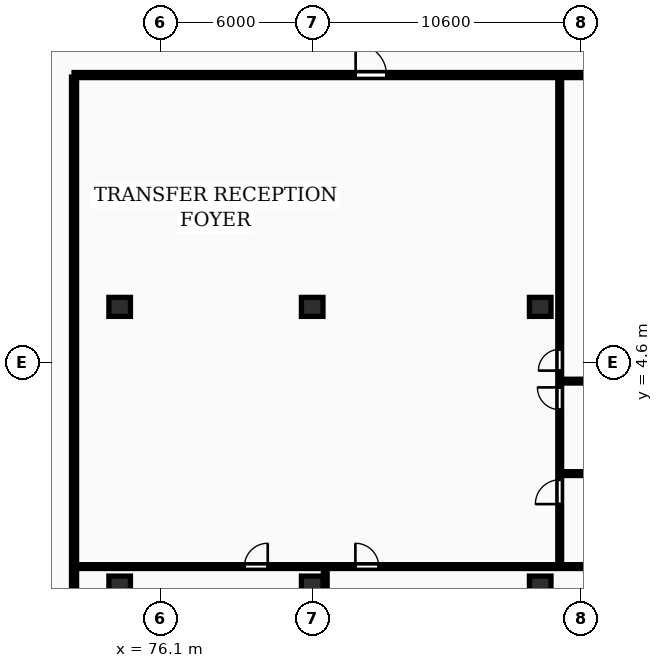
"""IFC4 building model, lengths in metres.
Left out: names, types, materials, properties, quantities, classifications, styles, units other than length and angle.
Written with IfcOpenShell. Run it as: python <this file> out.ifc"""

import sys

from ifc_helpers import new_model, si_unit, direction, frame, frame_2d, origin, origin_2d, place, context, subcontext, project, spatial, rectangle, extrude, element, fill, save


model = new_model("IFC4")
c1 = context("Model", 3, precision=1e-05, world=origin(), true_north=direction((0.0, 1.0)))
c2 = subcontext(c1, "Body", "Model", "MODEL_VIEW")
j1 = project(units=[si_unit("LENGTHUNIT", "METRE"), si_unit("PLANEANGLEUNIT", "RADIAN")], contexts=[c1])
p1 = place(None, origin())
s1 = spatial("IfcSite", under=j1, at=p1, CompositionType="ELEMENT")
p2 = place(p1, origin())
s2 = spatial("IfcBuilding", under=s1, at=p2, CompositionType="ELEMENT")
p3 = place(p2, frame((0.0, 0.0, 93.8)))
s3 = spatial("IfcBuildingStorey", under=s2, at=p3, CompositionType="ELEMENT", Elevation=93.8)
for number, where, z_axis, x_axis in (
    (1, (74.5, -4.2, 0.0), (0.0, 0.0, 1.0), (1.0, 0.0, 0.0)),
    (2, (74.5, 6.8, 0.0), (0.0, 0.0, 1.0), (1.0, 0.0, 0.0)),
    (3, (82.1, -4.2, 0.0), (0.0, 0.0, 1.0), (1.0, 0.0, 0.0)),
    (4, (82.1, 6.8, 0.0), (0.0, 0.0, 1.0), (1.0, 0.0, 0.0)),
    (5, (91.1, -4.2, 0.0), (0.0, 0.0, 1.0), (1.0, 0.0, 0.0)),
    (6, (91.1, 6.8, 0.0), (0.0, 0.0, 1.0), (1.0, 0.0, 0.0)),
):
    element("IfcColumn", number, at=place(p3, frame(where, z_axis=z_axis, x_axis=x_axis)), inside=s3, PredefinedType="COLUMN", context=c2, shape_type="SweptSolid", body=[
        extrude(rectangle(XDim=0.85, YDim=0.75, at=origin_2d()), origin(), (0.0, 0.0, 1.0), 3.25),
    ])
p4 = place(p3, frame((72.7, -8.7, 0.0), z_axis=(0.0, 0.0, 1.0), x_axis=(0.0, 1.0, 0.0)))
e7 = element("IfcWall", 7, at=p4, inside=s3, PredefinedType="PARTITIONING", context=c2, shape_type="SweptSolid", body=[
    extrude(rectangle(XDim=24.57, YDim=0.2, at=frame_2d((12.285, 0.0))), origin(), (0.0, 0.0, 1.0), 2.97),
])
for number, where, z_axis, x_axis in (
    (8, (91.929, 0.22, 0.0), (0.0, 0.0, 1.0), (1.0, 0.0, 0.0)),
    (9, (91.929, 3.87, 0.0), (0.0, 0.0, 1.0), (1.0, 0.0, 0.0)),
):
    element("IfcWall", number, at=place(p3, frame(where, z_axis=z_axis, x_axis=x_axis)), inside=s3, PredefinedType="PARTITIONING", context=c2, shape_type="SweptSolid", body=[
        extrude(rectangle(XDim=3.36, YDim=0.15, at=frame_2d((1.68, 0.0))), origin(), (0.0, 0.0, 1.0), 2.97),
    ])
p5 = place(p3, frame((91.869, -3.39, 0.0), z_axis=(0.0, 0.0, 1.0), x_axis=(0.0, 1.0, 0.0)))
e10 = element("IfcWall", 10, at=p5, inside=s3, PredefinedType="PARTITIONING", context=c2, shape_type="SweptSolid", body=[
    extrude(rectangle(XDim=19.28, YDim=0.15, at=frame_2d((9.64, 0.0))), origin(), (0.0, 0.0, 1.0), 2.97),
])
p6 = place(p5, frame((2.406, 0.0, 0.0)))
e11 = element("IfcOpeningElement", 11, at=p6, cuts=e10, PredefinedType="OPENING", context=c2, shape_type="SweptSolid", body=[
    extrude(rectangle(XDim=0.96, YDim=2.1, at=frame_2d((0.48, 1.05))), frame((0.0, 0.085, 0.0), z_axis=(0.0, -1.0, 0.0), x_axis=(1.0, 0.0, 0.0)), (0.0, 0.0, 1.0), 0.17),
])
p7 = place(p5, frame((6.133, 0.0, 0.0)))
e12 = element("IfcOpeningElement", 12, at=p7, cuts=e10, PredefinedType="OPENING", context=c2, shape_type="SweptSolid", body=[
    extrude(rectangle(XDim=0.88, YDim=2.06, at=frame_2d((0.44, 1.03))), frame((0.0, 0.085, 0.0), z_axis=(0.0, -1.0, 0.0), x_axis=(1.0, 0.0, 0.0)), (0.0, 0.0, 1.0), 0.17),
])
p8 = place(p5, frame((7.674, 0.0, 0.0)))
e13 = element("IfcOpeningElement", 13, at=p8, cuts=e10, PredefinedType="OPENING", context=c2, shape_type="SweptSolid", body=[
    extrude(rectangle(XDim=0.84, YDim=2.04, at=frame_2d((0.42, 1.02))), frame((0.0, 0.085, 0.0), z_axis=(0.0, -1.0, 0.0), x_axis=(1.0, 0.0, 0.0)), (0.0, 0.0, 1.0), 0.17),
])
p9 = place(p3, frame((82.615, -8.7, 0.0), z_axis=(0.0, 0.0, 1.0), x_axis=(0.0, 1.0, 0.0)))
e14 = element("IfcWall", 14, at=p9, inside=s3, PredefinedType="PARTITIONING", context=c2, shape_type="SweptSolid", body=[
    extrude(rectangle(XDim=5.17, YDim=0.15, at=frame_2d((2.585, 0.0))), origin(), (0.0, 0.0, 1.0), 2.97),
])
p10 = place(p3, frame((72.78, -3.45, 0.0), z_axis=(0.0, 0.0, 1.0), x_axis=(1.0, 0.0, 0.0)))
e15 = element("IfcWall", 15, at=p10, inside=s3, PredefinedType="PARTITIONING", context=c2, shape_type="SweptSolid", body=[
    extrude(rectangle(XDim=22.509, YDim=0.15, at=frame_2d((11.254, 0.0))), origin(), (0.0, 0.0, 1.0), 2.97),
])
p11 = place(p10, frame((6.645, 0.0, 0.0)))
e16 = element("IfcOpeningElement", 16, at=p11, cuts=e15, PredefinedType="OPENING", context=c2, shape_type="SweptSolid", body=[
    extrude(rectangle(XDim=0.92, YDim=2.08, at=frame_2d((0.46, 1.04))), frame((0.0, 0.085, 0.0), z_axis=(0.0, -1.0, 0.0), x_axis=(1.0, 0.0, 0.0)), (0.0, 0.0, 1.0), 0.17),
])
p12 = place(p10, frame((11.024, 0.0, 0.0)))
e17 = element("IfcOpeningElement", 17, at=p12, cuts=e15, PredefinedType="OPENING", context=c2, shape_type="SweptSolid", body=[
    extrude(rectangle(XDim=0.92, YDim=2.08, at=frame_2d((0.46, 1.04))), frame((0.0, 0.085, 0.0), z_axis=(0.0, -1.0, 0.0), x_axis=(1.0, 0.0, 0.0)), (0.0, 0.0, 1.0), 0.17),
])
p13 = place(p3, frame((72.7, 15.95, 0.0), z_axis=(0.0, 0.0, 1.0), x_axis=(1.0, 0.0, 0.0)))
e18 = element("IfcWall", 18, at=p13, inside=s3, PredefinedType="PARTITIONING", context=c2, shape_type="SweptSolid", body=[
    extrude(rectangle(XDim=58.0, YDim=0.2, at=frame_2d((29.0, 0.0))), origin(), (0.0, 0.0, 1.0), 2.97),
])
p14 = place(p13, frame((11.114, 0.0, 0.0)))
e19 = element("IfcOpeningElement", 19, at=p14, cuts=e18, PredefinedType="OPENING", context=c2, shape_type="SweptSolid", body=[
    extrude(rectangle(XDim=1.22, YDim=2.18, at=frame_2d((0.61, 1.09))), frame((0.0, 0.11, 0.0), z_axis=(0.0, -1.0, 0.0), x_axis=(1.0, 0.0, 0.0)), (0.0, 0.0, 1.0), 0.22),
])
p15 = place(p13, frame((32.304, 0.0, 0.0)))
e20 = element("IfcOpeningElement", 20, at=p15, cuts=e18, PredefinedType="OPENING", context=c2, shape_type="SweptSolid", body=[
    extrude(rectangle(XDim=1.22, YDim=2.18, at=frame_2d((0.61, 1.09))), frame((0.0, 0.11, 0.0), z_axis=(0.0, -1.0, 0.0), x_axis=(1.0, 0.0, 0.0)), (0.0, 0.0, 1.0), 0.22),
])
p16 = place(p13, frame((47.134, 0.0, 0.0)))
e21 = element("IfcOpeningElement", 21, at=p16, cuts=e18, PredefinedType="OPENING", context=c2, shape_type="SweptSolid", body=[
    extrude(rectangle(XDim=0.95, YDim=2.15, at=frame_2d((0.475, 1.075))), frame((0.0, 0.11, 0.0), z_axis=(0.0, -1.0, 0.0), x_axis=(1.0, 0.0, 0.0)), (0.0, 0.0, 1.0), 0.22),
])
p17 = place(p6, origin())
e22 = element("IfcDoor", 22, at=p17, inside=s3, OperationType="SINGLE_SWING_LEFT", PredefinedType="DOOR", context=c2, shape_type="SweptSolid", body=[
    extrude(rectangle(XDim=0.96, YDim=2.1, at=frame_2d((0.48, 1.05))), frame((0.0, 0.025, 0.0), z_axis=(0.0, -1.0, 0.0), x_axis=(1.0, 0.0, 0.0)), (0.0, 0.0, 1.0), 0.05),
])
fill(e11, e22)
p18 = place(p7, origin())
e23 = element("IfcDoor", 23, at=p18, inside=s3, OperationType="SINGLE_SWING_RIGHT", PredefinedType="DOOR", context=c2, shape_type="SweptSolid", body=[
    extrude(rectangle(XDim=0.88, YDim=2.06, at=frame_2d((0.44, 1.03))), frame((0.0, 0.025, 0.0), z_axis=(0.0, -1.0, 0.0), x_axis=(1.0, 0.0, 0.0)), (0.0, 0.0, 1.0), 0.05),
])
fill(e12, e23)
p19 = place(p8, origin())
e24 = element("IfcDoor", 24, at=p19, inside=s3, OperationType="SINGLE_SWING_LEFT", PredefinedType="DOOR", context=c2, shape_type="SweptSolid", body=[
    extrude(rectangle(XDim=0.84, YDim=2.04, at=frame_2d((0.42, 1.02))), frame((0.0, 0.025, 0.0), z_axis=(0.0, -1.0, 0.0), x_axis=(1.0, 0.0, 0.0)), (0.0, 0.0, 1.0), 0.05),
])
fill(e13, e24)
p20 = place(p11, origin())
e25 = element("IfcDoor", 25, at=p20, inside=s3, OperationType="SINGLE_SWING_RIGHT", PredefinedType="DOOR", context=c2, shape_type="SweptSolid", body=[
    extrude(rectangle(XDim=0.92, YDim=2.08, at=frame_2d((0.46, 1.04))), frame((0.0, 0.025, 0.0), z_axis=(0.0, -1.0, 0.0), x_axis=(1.0, 0.0, 0.0)), (0.0, 0.0, 1.0), 0.05),
])
fill(e16, e25)
p21 = place(p12, origin())
e26 = element("IfcDoor", 26, at=p21, inside=s3, OperationType="SINGLE_SWING_LEFT", PredefinedType="DOOR", context=c2, shape_type="SweptSolid", body=[
    extrude(rectangle(XDim=0.92, YDim=2.08, at=frame_2d((0.46, 1.04))), frame((0.0, 0.025, 0.0), z_axis=(0.0, -1.0, 0.0), x_axis=(1.0, 0.0, 0.0)), (0.0, 0.0, 1.0), 0.05),
])
fill(e17, e26)
p22 = place(p14, origin())
e27 = element("IfcDoor", 27, at=p22, inside=s3, OperationType="SINGLE_SWING_LEFT", PredefinedType="DOOR", context=c2, shape_type="SweptSolid", body=[
    extrude(rectangle(XDim=1.22, YDim=2.18, at=frame_2d((0.61, 1.09))), frame((0.0, 0.025, 0.0), z_axis=(0.0, -1.0, 0.0), x_axis=(1.0, 0.0, 0.0)), (0.0, 0.0, 1.0), 0.05),
])
fill(e19, e27)
save(model, sys.argv[1])
